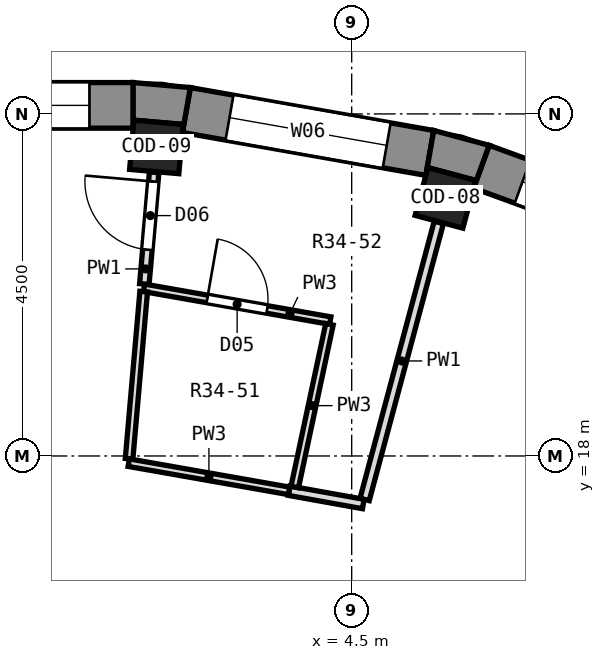
"""IFC4 building model, lengths in metres.
Left out: names, types, materials, properties, quantities, classifications, styles, units other than length and angle.
Written with IfcOpenShell. Run it as: python <this file> out.ifc"""

import sys

from ifc_helpers import new_model, si_unit, direction, frame, frame_2d, origin, origin_2d, place, context, subcontext, project, spatial, polyline, rectangle, outline, extrude, element, fill, save


model = new_model("IFC4")
c1 = context("Model", 3, precision=1e-05, world=origin(), true_north=direction((0.0, 1.0)))
c2 = subcontext(c1, "Body", "Model", "MODEL_VIEW")
j1 = project(units=[si_unit("LENGTHUNIT", "METRE"), si_unit("PLANEANGLEUNIT", "RADIAN")], contexts=[c1])
p1 = place(None, origin())
s1 = spatial("IfcSite", under=j1, at=p1, CompositionType="ELEMENT")
p2 = place(p1, origin())
s2 = spatial("IfcBuilding", under=s1, at=p2, CompositionType="ELEMENT")
p3 = place(p2, frame((0.0, 0.0, 239.6)))
s3 = spatial("IfcBuildingStorey", under=s2, at=p3, CompositionType="ELEMENT", Elevation=239.6)
for number, where, z_axis, x_axis in (
    (1, (5.733, 21.395, 0.0), (0.0, 0.0, 1.0), (0.259, 0.966, 0.0)),
    (2, (1.93, 22.066, 0.0), (0.0, 0.0, 1.0), (0.087, 0.996, 0.0)),
):
    element("IfcColumn", number, at=place(p3, frame(where, z_axis=z_axis, x_axis=x_axis)), inside=s3, PredefinedType="COLUMN", context=c2, shape_type="SweptSolid", body=[
        extrude(rectangle(XDim=0.65, YDim=0.65, at=origin_2d()), origin(), (0.0, 0.0, 1.0), 3.3),
    ])
p4 = place(p3, frame((9.262, 20.693, 0.0), z_axis=(0.0, 0.0, 1.0), x_axis=(-0.939679383794, 0.342056509473, 0.0)))
e3 = element("IfcWall", 3, at=p4, inside=s3, PredefinedType="SOLIDWALL", context=c2, shape_type="SweptSolid", body=[
    extrude(rectangle(XDim=3.252, YDim=0.6, at=frame_2d((1.626, 0.0))), origin(), (0.0, 0.0, 1.0), 2.9),
])
p5 = place(p4, frame((0.576, 0.0, 0.9)))
e4 = element("IfcOpeningElement", 4, at=p5, cuts=e3, PredefinedType="OPENING", context=c2, shape_type="SweptSolid", body=[
    extrude(rectangle(XDim=2.1, YDim=1.8, at=frame_2d((1.05, 0.9))), frame((0.0, 0.312, 0.0), z_axis=(0.0, -1.0, 0.0), x_axis=(1.0, 0.0, 0.0)), (0.0, 0.0, 1.0), 0.624),
])
p6 = place(p3, frame((5.528, 21.987, 0.0), z_axis=(0.0, 0.0, 1.0), x_axis=(-0.984806225186, 0.173656842178, 0.0)))
e5 = element("IfcWall", 5, at=p6, inside=s3, PredefinedType="SOLIDWALL", context=c2, shape_type="SweptSolid", body=[
    extrude(rectangle(XDim=3.252, YDim=0.6, at=frame_2d((1.626, 0.0))), origin(), (0.0, 0.0, 1.0), 2.9),
])
p7 = place(p6, frame((0.576, 0.0, 0.9)))
e6 = element("IfcOpeningElement", 6, at=p7, cuts=e5, PredefinedType="OPENING", context=c2, shape_type="SweptSolid", body=[
    extrude(rectangle(XDim=2.1, YDim=1.8, at=frame_2d((1.05, 0.9))), frame((0.0, 0.312, 0.0), z_axis=(0.0, -1.0, 0.0), x_axis=(1.0, 0.0, 0.0)), (0.0, 0.0, 1.0), 0.624),
])
p8 = place(p3, frame((1.626, 22.613, 0.0), z_axis=(0.0, 0.0, 1.0), x_axis=(-1.0, 0.0, 0.0)))
e7 = element("IfcWall", 7, at=p8, inside=s3, PredefinedType="SOLIDWALL", context=c2, shape_type="SweptSolid", body=[
    extrude(rectangle(XDim=3.251, YDim=0.6, at=frame_2d((1.626, 0.0))), origin(), (0.0, 0.0, 1.0), 2.9),
])
p9 = place(p8, frame((0.576, 0.0, 0.9)))
e8 = element("IfcOpeningElement", 8, at=p9, cuts=e7, PredefinedType="OPENING", context=c2, shape_type="SweptSolid", body=[
    extrude(rectangle(XDim=2.1, YDim=1.8, at=frame_2d((1.05, 0.9))), frame((0.0, 0.312, 0.0), z_axis=(0.0, -1.0, 0.0), x_axis=(1.0, 0.0, 0.0)), (0.0, 0.0, 1.0), 0.624),
])
p10 = place(p3, origin())
e9 = element("IfcWall", 9, at=p10, inside=s3, PredefinedType="SOLIDWALL", context=c2, shape_type="SweptSolid", body=[
    extrude(outline(polyline([(5.58, 22.282), (5.476, 21.691), (5.503, 21.793), (6.131, 21.625), (6.104, 21.523), (6.309, 22.087), (5.58, 22.282)])), origin(), (0.0, 0.0, 1.0), 2.9),
])
p11 = place(p3, origin())
e10 = element("IfcWall", 10, at=p11, inside=s3, PredefinedType="SOLIDWALL", context=c2, shape_type="SweptSolid", body=[
    extrude(outline(polyline([(2.378, 22.847), (1.626, 22.913), (1.626, 22.312), (1.635, 22.418), (2.283, 22.361), (2.273, 22.256), (2.378, 22.847)])), origin(), (0.0, 0.0, 1.0), 2.9),
])
p12 = place(p3, frame((3.677, 17.543, 0.0), z_axis=(0.0, 0.0, 1.0), x_axis=(0.984296443918, -0.176523399272, 0.0)))
e11 = element("IfcWall", 11, at=p12, inside=s3, PredefinedType="PARTITIONING", context=c2, shape_type="SweptSolid", body=[
    extrude(rectangle(XDim=0.992, YDim=0.125, at=frame_2d((0.496, 0.0))), origin(), (0.0, 0.0, 1.0), 2.9),
])
p13 = place(p3, frame((1.567, 17.912, 0.0), z_axis=(0.0, 0.0, 1.0), x_axis=(0.984859193769, -0.173356189529, 0.0)))
e12 = element("IfcWall", 12, at=p13, inside=s3, PredefinedType="PARTITIONING", context=c2, shape_type="SweptSolid", body=[
    extrude(rectangle(XDim=2.142, YDim=0.1, at=frame_2d((1.071, 0.0))), origin(), (0.0, 0.0, 1.0), 2.9),
])
p14 = place(p3, frame((1.768, 20.212, 0.0), z_axis=(0.0, 0.0, 1.0), x_axis=(0.984882203063, -0.173225419871, 0.0)))
e13 = element("IfcWall", 13, at=p14, inside=s3, PredefinedType="PARTITIONING", context=c2, shape_type="SweptSolid", body=[
    extrude(rectangle(XDim=2.488, YDim=0.1, at=frame_2d((1.244, 0.0))), origin(), (0.0, 0.0, 1.0), 2.9),
])
p15 = place(p14, frame((0.844, 0.0, 0.0)))
e14 = element("IfcOpeningElement", 14, at=p15, cuts=e13, PredefinedType="OPENING", context=c2, shape_type="SweptSolid", body=[
    extrude(rectangle(XDim=0.8, YDim=2.1, at=frame_2d((0.4, 1.05))), frame((0.0, 0.062, 0.0), z_axis=(0.0, -1.0, 0.0), x_axis=(1.0, 0.0, 0.0)), (0.0, 0.0, 1.0), 0.124),
])
p16 = place(p3, frame((6.175, 13.261, 0.0), z_axis=(0.0, 0.0, 1.0), x_axis=(0.425078700153, 0.905156394595, 0.0)))
e15 = element("IfcWall", 15, at=p16, inside=s3, PredefinedType="PARTITIONING", context=c2, shape_type="SweptSolid", body=[
    extrude(rectangle(XDim=7.187, YDim=0.15, at=frame_2d((3.593, 0.0))), origin(), (0.0, 0.0, 1.0), 2.9),
])
p17 = place(p3, frame((4.671, 17.428, 0.0), z_axis=(0.0, 0.0, 1.0), x_axis=(0.258585096905, 0.965988482156, 0.0)))
e16 = element("IfcWall", 16, at=p17, inside=s3, PredefinedType="PARTITIONING", context=c2, shape_type="SweptSolid", body=[
    extrude(rectangle(XDim=3.772, YDim=0.125, at=frame_2d((1.886, 0.0))), origin(), (0.0, 0.0, 1.0), 2.9),
])
p18 = place(p3, frame((3.751, 17.591, 0.0), z_axis=(0.0, 0.0, 1.0), x_axis=(0.208561664849, 0.978009218748, 0.0)))
e17 = element("IfcWall", 17, at=p18, inside=s3, PredefinedType="PARTITIONING", context=c2, shape_type="SweptSolid", body=[
    extrude(rectangle(XDim=2.189, YDim=0.1, at=frame_2d((1.094, 0.0))), origin(), (0.0, 0.0, 1.0), 2.9),
])
p19 = place(p3, frame((1.572, 17.963, 0.0), z_axis=(0.0, 0.0, 1.0), x_axis=(0.087035248455, 0.996205232634, 0.0)))
e18 = element("IfcWall", 18, at=p19, inside=s3, PredefinedType="PARTITIONING", context=c2, shape_type="SweptSolid", body=[
    extrude(rectangle(XDim=2.208, YDim=0.1, at=frame_2d((1.104, 0.0))), origin(), (0.0, 0.0, 1.0), 2.9),
])
p20 = place(p3, frame((1.772, 20.262, 0.0), z_axis=(0.0, 0.0, 1.0), x_axis=(0.087179262922, 0.996192640063, 0.0)))
e19 = element("IfcWall", 19, at=p20, inside=s3, PredefinedType="PARTITIONING", context=c2, shape_type="SweptSolid", body=[
    extrude(rectangle(XDim=1.476, YDim=0.125, at=frame_2d((0.738, 0.0))), origin(), (0.0, 0.0, 1.0), 2.9),
])
p21 = place(p20, frame((0.454, 0.0, 0.0)))
e20 = element("IfcOpeningElement", 20, at=p21, cuts=e19, PredefinedType="OPENING", context=c2, shape_type="SweptSolid", body=[
    extrude(rectangle(XDim=0.9, YDim=2.1, at=frame_2d((0.45, 1.05))), frame((0.0, 0.074, 0.0), z_axis=(0.0, -1.0, 0.0), x_axis=(1.0, 0.0, 0.0)), (0.0, 0.0, 1.0), 0.149),
])
p22 = place(p5, origin())
e21 = element("IfcWindow", 21, at=p22, inside=s3, PartitioningType="SINGLE_PANEL", PredefinedType="WINDOW", context=c2, shape_type="SweptSolid", body=[
    extrude(rectangle(XDim=2.1, YDim=1.8, at=frame_2d((1.05, 0.9))), frame((0.0, 0.18, 0.0), z_axis=(0.0, -1.0, 0.0), x_axis=(1.0, 0.0, 0.0)), (0.0, 0.0, 1.0), 0.06),
])
fill(e4, e21)
p23 = place(p7, origin())
e22 = element("IfcWindow", 22, at=p23, inside=s3, PartitioningType="SINGLE_PANEL", PredefinedType="WINDOW", context=c2, shape_type="SweptSolid", body=[
    extrude(rectangle(XDim=2.1, YDim=1.8, at=frame_2d((1.05, 0.9))), frame((0.0, 0.18, 0.0), z_axis=(0.0, -1.0, 0.0), x_axis=(1.0, 0.0, 0.0)), (0.0, 0.0, 1.0), 0.06),
])
fill(e6, e22)
p24 = place(p9, origin())
e23 = element("IfcWindow", 23, at=p24, inside=s3, PartitioningType="SINGLE_PANEL", PredefinedType="WINDOW", context=c2, shape_type="SweptSolid", body=[
    extrude(rectangle(XDim=2.1, YDim=1.8, at=frame_2d((1.05, 0.9))), frame((0.0, 0.18, 0.0), z_axis=(0.0, -1.0, 0.0), x_axis=(1.0, 0.0, 0.0)), (0.0, 0.0, 1.0), 0.06),
])
fill(e8, e23)
p25 = place(p15, origin())
e24 = element("IfcDoor", 24, at=p25, inside=s3, OperationType="SINGLE_SWING_LEFT", PredefinedType="DOOR", context=c2, shape_type="SweptSolid", body=[
    extrude(rectangle(XDim=0.8, YDim=2.1, at=frame_2d((0.4, 1.05))), frame((0.0, 0.025, 0.0), z_axis=(0.0, -1.0, 0.0), x_axis=(1.0, 0.0, 0.0)), (0.0, 0.0, 1.0), 0.05),
])
fill(e14, e24)
p26 = place(p21, origin())
e25 = element("IfcDoor", 25, at=p26, inside=s3, OperationType="SINGLE_SWING_RIGHT", PredefinedType="DOOR", context=c2, shape_type="SweptSolid", body=[
    extrude(rectangle(XDim=0.9, YDim=2.1, at=frame_2d((0.45, 1.05))), frame((0.0, 0.025, 0.0), z_axis=(0.0, -1.0, 0.0), x_axis=(1.0, 0.0, 0.0)), (0.0, 0.0, 1.0), 0.05),
])
fill(e20, e25)
save(model, sys.argv[1])
